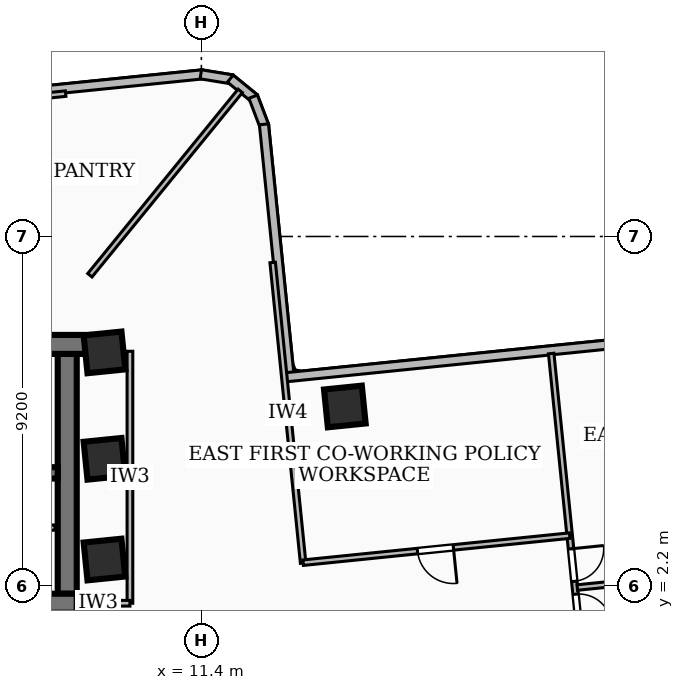
"""IFC4 building model, lengths in metres.
Left out: names, types, materials, properties, quantities, classifications, styles, units other than length and angle.
Written with IfcOpenShell. Run it as: python <this file> out.ifc"""

import sys

from ifc_helpers import new_model, si_unit, direction, frame, frame_2d, origin, origin_2d, place, context, subcontext, project, spatial, rectangle, extrude, element, fill, save


model = new_model("IFC4")
c1 = context("Model", 3, precision=1e-05, world=origin(), true_north=direction((0.0, 1.0)))
c2 = subcontext(c1, "Body", "Model", "MODEL_VIEW")
j1 = project(units=[si_unit("LENGTHUNIT", "METRE"), si_unit("PLANEANGLEUNIT", "RADIAN")], contexts=[c1])
p1 = place(None, origin())
s1 = spatial("IfcSite", under=j1, at=p1, CompositionType="ELEMENT")
p2 = place(p1, origin())
s2 = spatial("IfcBuilding", under=s1, at=p2, CompositionType="ELEMENT")
p3 = place(p2, frame((0.0, 0.0, 71.28)))
s3 = spatial("IfcBuildingStorey", under=s2, at=p3, CompositionType="ELEMENT", Elevation=71.28)
p4 = place(p3, frame((-8.78, 8.56, 0.0), z_axis=(0.0, 0.0, 1.0), x_axis=(1.0, 0.0, 0.0)))
e1 = element("IfcWall", 1, at=p4, inside=s3, PredefinedType="SHEAR", context=c2, shape_type="SweptSolid", body=[
    extrude(rectangle(XDim=17.56, YDim=0.5, at=frame_2d((8.78, 0.0))), origin(), (0.0, 0.0, 1.0), 3.34),
])
p5 = place(p3, frame((8.12, 1.75, 0.0), z_axis=(0.0, 0.0, 1.0), x_axis=(-1.0, 0.0, 0.0)))
e2 = element("IfcWall", 2, at=p5, inside=s3, PredefinedType="SHEAR", context=c2, shape_type="SweptSolid", body=[
    extrude(rectangle(XDim=16.24, YDim=0.5, at=frame_2d((8.12, 0.0))), origin(), (0.0, 0.0, 1.0), 3.34),
])
p6 = place(p5, frame((7.45, 0.0, 0.0)))
e3 = element("IfcOpeningElement", 3, at=p6, cuts=e2, PredefinedType="OPENING", context=c2, shape_type="SweptSolid", body=[
    extrude(rectangle(XDim=1.0, YDim=2.1, at=frame_2d((0.5, 1.05))), frame((0.0, 0.26, 0.0), z_axis=(0.0, -1.0, 0.0), x_axis=(1.0, 0.0, 0.0)), (0.0, 0.0, 1.0), 0.52),
])
p7 = place(p5, frame((3.4, 0.0, 0.0)))
e4 = element("IfcOpeningElement", 4, at=p7, cuts=e2, PredefinedType="OPENING", context=c2, shape_type="SweptSolid", body=[
    extrude(rectangle(XDim=0.9, YDim=2.06, at=frame_2d((0.45, 1.03))), frame((0.0, 0.26, 0.0), z_axis=(0.0, -1.0, 0.0), x_axis=(1.0, 0.0, 0.0)), (0.0, 0.0, 1.0), 0.52),
])
p8 = place(p5, frame((1.1, 0.0, 0.0)))
e5 = element("IfcOpeningElement", 5, at=p8, cuts=e2, PredefinedType="OPENING", context=c2, shape_type="SweptSolid", body=[
    extrude(rectangle(XDim=0.9, YDim=2.06, at=frame_2d((0.45, 1.03))), frame((0.0, 0.26, 0.0), z_axis=(0.0, -1.0, 0.0), x_axis=(1.0, 0.0, 0.0)), (0.0, 0.0, 1.0), 0.52),
])
p9 = place(p3, frame((7.87, 8.31, 0.0), z_axis=(0.0, 0.0, 1.0), x_axis=(0.0, -1.0, 0.0)))
e6 = element("IfcWall", 6, at=p9, inside=s3, PredefinedType="SHEAR", context=c2, shape_type="SweptSolid", body=[
    extrude(rectangle(XDim=6.31, YDim=0.5, at=frame_2d((3.155, 0.0))), origin(), (0.0, 0.0, 1.0), 3.34),
])
p10 = place(p3, frame((7.62, 5.18, 0.0), z_axis=(0.0, 0.0, 1.0), x_axis=(-1.0, 0.0, 0.0)))
e7 = element("IfcWall", 7, at=p10, inside=s3, PredefinedType="SOLIDWALL", context=c2, shape_type="SweptSolid", body=[
    extrude(rectangle(XDim=15.24, YDim=0.3, at=frame_2d((7.62, 0.0))), origin(), (0.0, 0.0, 1.0), 3.34),
])
p11 = place(p10, frame((5.77, 0.0, 0.0)))
e8 = element("IfcOpeningElement", 8, at=p11, cuts=e7, PredefinedType="OPENING", context=c2, shape_type="SweptSolid", body=[
    extrude(rectangle(XDim=1.1, YDim=2.15, at=frame_2d((0.55, 1.075))), frame((0.0, 0.16, 0.0), z_axis=(0.0, -1.0, 0.0), x_axis=(1.0, 0.0, 0.0)), (0.0, 0.0, 1.0), 0.32),
])
p12 = place(p10, frame((2.97, 0.0, 0.0)))
e9 = element("IfcOpeningElement", 9, at=p12, cuts=e7, PredefinedType="OPENING", context=c2, shape_type="SweptSolid", body=[
    extrude(rectangle(XDim=1.1, YDim=2.15, at=frame_2d((0.55, 1.075))), frame((0.0, 0.16, 0.0), z_axis=(0.0, -1.0, 0.0), x_axis=(1.0, 0.0, 0.0)), (0.0, 0.0, 1.0), 0.32),
])
p13 = place(p10, frame((7.97, 0.0, 0.0)))
e10 = element("IfcOpeningElement", 10, at=p13, cuts=e7, PredefinedType="OPENING", context=c2, shape_type="SweptSolid", body=[
    extrude(rectangle(XDim=1.0, YDim=2.1, at=frame_2d((0.5, 1.05))), frame((0.0, 0.16, 0.0), z_axis=(0.0, -1.0, 0.0), x_axis=(1.0, 0.0, 0.0)), (0.0, 0.0, 1.0), 0.32),
])
for number, where, z_axis, x_axis in (
    (11, (8.85, 2.9, 0.0), (0.0, 0.0, 1.0), (0.995, 0.101, 0.0)),
    (12, (8.85, 5.55, 0.0), (0.0, 0.0, 1.0), (0.995, 0.101, 0.0)),
    (13, (8.85, 8.35, 0.0), (0.0, 0.0, 1.0), (0.995, 0.101, 0.0)),
    (14, (15.175, 6.927, 0.0), (0.0, 0.0, 1.0), (0.995, 0.101, 0.0)),
):
    element("IfcColumn", number, at=place(p3, frame(where, z_axis=z_axis, x_axis=x_axis)), inside=s3, PredefinedType="COLUMN", context=c2, shape_type="SweptSolid", body=[
        extrude(rectangle(XDim=1.0, YDim=1.0, at=origin_2d()), origin(), (0.0, 0.0, 1.0), 3.6),
    ])
p14 = place(p3, frame((4.694, 14.981, 0.0), z_axis=(0.0, 0.0, 1.0), x_axis=(0.994875719665, 0.101105402534, 0.0)))
e15 = element("IfcWall", 15, at=p14, inside=s3, PredefinedType="SOLIDWALL", context=c2, shape_type="SweptSolid", body=[
    extrude(rectangle(XDim=6.776, YDim=0.24, at=frame_2d((3.388, 0.0))), origin(), (0.0, 0.0, 1.0), 2.486),
])
p15 = place(p3, frame((11.385, 15.667, 0.0), z_axis=(0.0, 0.0, 1.0), x_axis=(0.987091669755, -0.160156284613, 0.0)))
e16 = element("IfcWall", 16, at=p15, inside=s3, PredefinedType="SOLIDWALL", context=c2, shape_type="SweptSolid", body=[
    extrude(rectangle(XDim=0.831, YDim=0.24, at=frame_2d((0.416, 0.0))), origin(), (0.0, 0.0, 1.0), 3.34),
])
p16 = place(p3, frame((12.161, 15.554, 0.0), z_axis=(0.0, 0.0, 1.0), x_axis=(0.774946287969, -0.632027096542, 0.0)))
e17 = element("IfcWall", 17, at=p16, inside=s3, PredefinedType="SOLIDWALL", context=c2, shape_type="SweptSolid", body=[
    extrude(rectangle(XDim=0.813, YDim=0.24, at=frame_2d((0.407, 0.0))), origin(), (0.0, 0.0, 1.0), 3.34),
])
p17 = place(p3, frame((12.763, 15.079, 0.0), z_axis=(0.0, 0.0, 1.0), x_axis=(0.355469529522, -0.934687869602, 0.0)))
e18 = element("IfcWall", 18, at=p17, inside=s3, PredefinedType="SOLIDWALL", context=c2, shape_type="SweptSolid", body=[
    extrude(rectangle(XDim=0.83, YDim=0.24, at=frame_2d((0.415, 0.0))), origin(), (0.0, 0.0, 1.0), 3.34),
])
p18 = place(p3, frame((13.046, 14.351, 0.0), z_axis=(0.0, 0.0, 1.0), x_axis=(0.101248053545, -0.994861212257, 0.0)))
e19 = element("IfcWall", 19, at=p18, inside=s3, PredefinedType="SOLIDWALL", context=c2, shape_type="SweptSolid", body=[
    extrude(rectangle(XDim=6.776, YDim=0.24, at=frame_2d((3.388, 0.0))), origin(), (0.0, 0.0, 1.0), 3.34),
])
p19 = place(p3, frame((13.626, 7.696, 0.0), z_axis=(0.0, 0.0, 1.0), x_axis=(0.994872930989, 0.101132839298, 0.0)))
e20 = element("IfcWall", 20, at=p19, inside=s3, PredefinedType="SOLIDWALL", context=c2, shape_type="SweptSolid", body=[
    extrude(rectangle(XDim=16.276, YDim=0.24, at=frame_2d((8.138, 0.0))), origin(), (0.0, 0.0, 1.0), 3.34),
])
p20 = place(p19, frame((13.675, 0.0, 0.85)))
e21 = element("IfcOpeningElement", 21, at=p20, cuts=e20, PredefinedType="OPENING", context=c2, shape_type="SweptSolid", body=[
    extrude(rectangle(XDim=1.5, YDim=1.5, at=frame_2d((0.75, 0.75))), frame((0.0, 0.13, 0.0), z_axis=(0.0, -1.0, 0.0), x_axis=(1.0, 0.0, 0.0)), (0.0, 0.0, 1.0), 0.26),
])
p21 = place(p3, frame((2.9, 3.74, 0.0), z_axis=(0.0, 0.0, 1.0), x_axis=(1.0, 0.0, 0.0)))
e22 = element("IfcWall", 22, at=p21, inside=s3, PredefinedType="PARTITIONING", context=c2, shape_type="SweptSolid", body=[
    extrude(rectangle(XDim=4.65, YDim=0.138, at=frame_2d((2.325, 0.0))), origin(), (0.0, 0.0, 1.0), 3.34),
])
p22 = place(p3, frame((9.52, 1.75, 0.0), z_axis=(0.0, 0.0, 1.0), x_axis=(0.0, 1.0, 0.0)))
e23 = element("IfcWall", 23, at=p22, inside=s3, PredefinedType="PARTITIONING", context=c2, shape_type="SweptSolid", body=[
    extrude(rectangle(XDim=6.63, YDim=0.15, at=frame_2d((3.315, 0.0))), origin(), (0.0, 0.0, 1.0), 2.486),
])
p23 = place(p3, frame((7.85, 1.75, 0.0), z_axis=(0.0, 0.0, 1.0), x_axis=(1.0, 0.0, 0.0)))
e24 = element("IfcWall", 24, at=p23, inside=s3, PredefinedType="PARTITIONING", context=c2, shape_type="SweptSolid", body=[
    extrude(rectangle(XDim=1.67, YDim=0.15, at=frame_2d((0.835, 0.0))), origin(), (0.0, 0.0, 1.0), 2.405),
])
p24 = place(p3, frame((8.466, 10.38, 0.0), z_axis=(0.0, 0.0, 1.0), x_axis=(0.631992375104, 0.774974604623, 0.0)))
e25 = element("IfcWall", 25, at=p24, inside=s3, PredefinedType="PARTITIONING", context=c2, shape_type="SweptSolid", body=[
    extrude(rectangle(XDim=6.26, YDim=0.145, at=frame_2d((3.13, 0.0))), origin(), (0.0, 0.0, 1.0), 3.34),
])
p25 = place(p3, frame((14.078, 2.807, 0.0), z_axis=(0.0, 0.0, 1.0), x_axis=(-0.100884076592, 0.994898187299, 0.0)))
e26 = element("IfcWall", 26, at=p25, inside=s3, PredefinedType="PARTITIONING", context=c2, shape_type="SweptSolid", body=[
    extrude(rectangle(XDim=7.95, YDim=0.145, at=frame_2d((3.975, 0.0))), origin(), (0.0, 0.0, 1.0), 2.486),
])
p26 = place(p3, frame((21.091, 3.529, 0.0), z_axis=(0.0, 0.0, 1.0), x_axis=(-0.994885188523, -0.101012185692, 0.0)))
e27 = element("IfcWall", 27, at=p26, inside=s3, PredefinedType="PARTITIONING", context=c2, shape_type="SweptSolid", body=[
    extrude(rectangle(XDim=7.05, YDim=0.145, at=frame_2d((3.525, 0.0))), origin(), (0.0, 0.0, 1.0), 3.34),
])
p27 = place(p26, frame((3.075, 0.0, 0.0)))
e28 = element("IfcOpeningElement", 28, at=p27, cuts=e27, PredefinedType="OPENING", context=c2, shape_type="SweptSolid", body=[
    extrude(rectangle(XDim=0.95, YDim=2.08, at=frame_2d((0.475, 1.04))), frame((0.0, 0.083, 0.0), z_axis=(0.0, -1.0, 0.0), x_axis=(1.0, 0.0, 0.0)), (0.0, 0.0, 1.0), 0.165),
])
p28 = place(p3, frame((21.29, 2.163, 0.0), z_axis=(0.0, 0.0, 1.0), x_axis=(0.994879916843, 0.101064093832, 0.0)))
e29 = element("IfcWall", 29, at=p28, inside=s3, PredefinedType="PARTITIONING", context=c2, shape_type="SweptSolid", body=[
    extrude(rectangle(XDim=10.595, YDim=0.145, at=frame_2d((5.298, 0.0))), origin(), (0.0, 0.0, 1.0), 2.793),
])
p29 = place(p3, frame((20.605, 8.32, 0.0), z_axis=(0.0, 0.0, 1.0), x_axis=(0.101040883761, -0.994882274346, 0.0)))
e30 = element("IfcWall", 30, at=p29, inside=s3, PredefinedType="PARTITIONING", context=c2, shape_type="SweptSolid", body=[
    extrude(rectangle(XDim=12.391, YDim=0.145, at=frame_2d((6.195, 0.0))), origin(), (0.0, 0.0, 1.0), 2.486),
])
p30 = place(p29, frame((6.365, 0.0, 0.0)))
e31 = element("IfcOpeningElement", 31, at=p30, cuts=e30, PredefinedType="OPENING", context=c2, shape_type="SweptSolid", body=[
    extrude(rectangle(XDim=0.86, YDim=2.04, at=frame_2d((0.43, 1.02))), frame((0.0, 0.083, 0.0), z_axis=(0.0, -1.0, 0.0), x_axis=(1.0, 0.0, 0.0)), (0.0, 0.0, 1.0), 0.165),
])
p31 = place(p29, frame((5.165, 0.0, 0.0)))
e32 = element("IfcOpeningElement", 32, at=p31, cuts=e30, PredefinedType="OPENING", context=c2, shape_type="SweptSolid", body=[
    extrude(rectangle(XDim=0.86, YDim=2.04, at=frame_2d((0.43, 1.02))), frame((0.0, 0.083, 0.0), z_axis=(0.0, -1.0, 0.0), x_axis=(1.0, 0.0, 0.0)), (0.0, 0.0, 1.0), 0.165),
])
p32 = place(p3, frame((7.828, 15.159, 0.0), z_axis=(0.0, 0.0, 1.0), x_axis=(-0.994873184944, -0.101130341041, 0.0)))
e33 = element("IfcWall", 33, at=p32, inside=s3, PredefinedType="PARTITIONING", context=c2, shape_type="SweptSolid", body=[
    extrude(rectangle(XDim=7.95, YDim=0.145, at=frame_2d((3.975, 0.0))), origin(), (0.0, 0.0, 1.0), 2.486),
])
p33 = place(p27, origin())
e34 = element("IfcDoor", 34, at=p33, inside=s3, OperationType="SINGLE_SWING_LEFT", PredefinedType="DOOR", context=c2, shape_type="SweptSolid", body=[
    extrude(rectangle(XDim=0.95, YDim=2.08, at=frame_2d((0.475, 1.04))), frame((0.0, 0.025, 0.0), z_axis=(0.0, -1.0, 0.0), x_axis=(1.0, 0.0, 0.0)), (0.0, 0.0, 1.0), 0.05),
])
fill(e28, e34)
p34 = place(p30, origin())
e35 = element("IfcDoor", 35, at=p34, inside=s3, OperationType="SINGLE_SWING_RIGHT", PredefinedType="DOOR", context=c2, shape_type="SweptSolid", body=[
    extrude(rectangle(XDim=0.86, YDim=2.04, at=frame_2d((0.43, 1.02))), frame((0.0, 0.025, 0.0), z_axis=(0.0, -1.0, 0.0), x_axis=(1.0, 0.0, 0.0)), (0.0, 0.0, 1.0), 0.05),
])
fill(e31, e35)
p35 = place(p31, origin())
e36 = element("IfcDoor", 36, at=p35, inside=s3, OperationType="SINGLE_SWING_LEFT", PredefinedType="DOOR", context=c2, shape_type="SweptSolid", body=[
    extrude(rectangle(XDim=0.86, YDim=2.04, at=frame_2d((0.43, 1.02))), frame((0.0, 0.025, 0.0), z_axis=(0.0, -1.0, 0.0), x_axis=(1.0, 0.0, 0.0)), (0.0, 0.0, 1.0), 0.05),
])
fill(e32, e36)
save(model, sys.argv[1])
